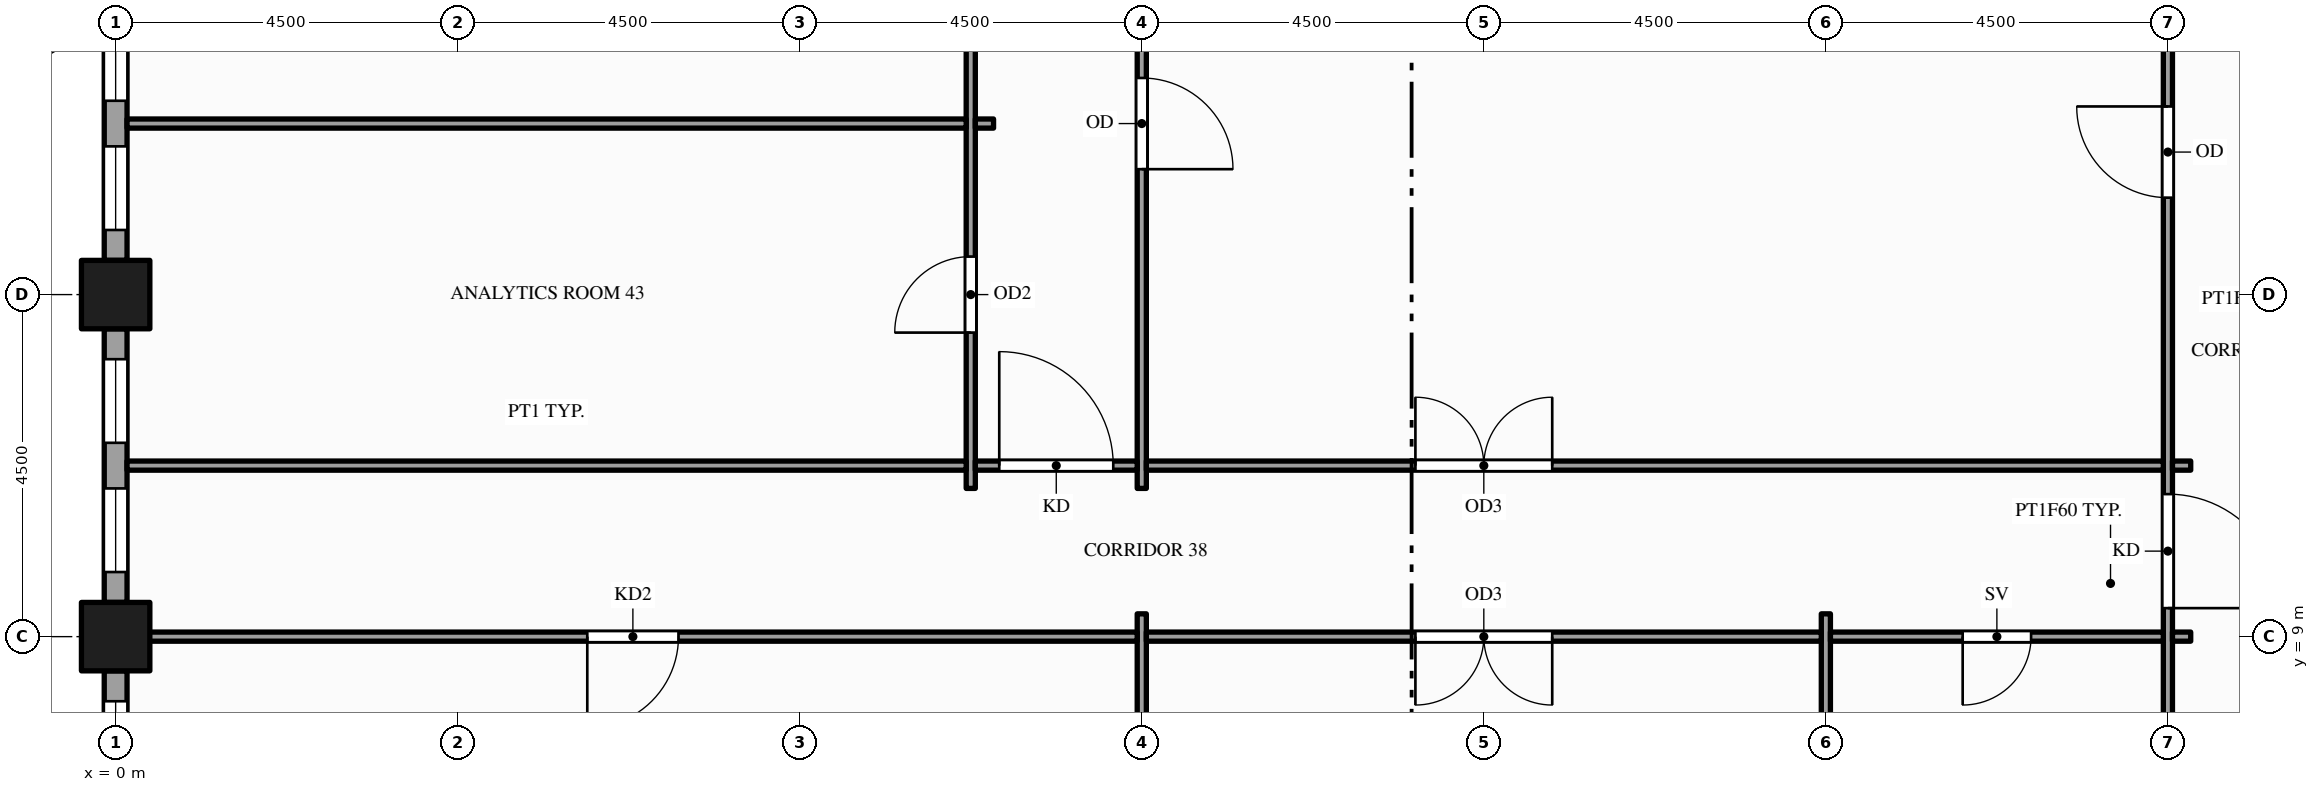
"""IFC4 building model, lengths in metres.
Left out: names, types, materials, properties, quantities, classifications, styles, units other than length and angle.
Written with IfcOpenShell. Run it as: python <this file> out.ifc"""

import sys

from ifc_helpers import new_model, si_unit, direction, frame, frame_2d, origin, origin_2d, place, context, subcontext, project, spatial, rectangle, hollow_rectangle, extrude, element, fill, save


model = new_model("IFC4")
c1 = context("Model", 3, precision=1e-05, world=origin(), true_north=direction((0.0, 1.0)))
c2 = subcontext(c1, "Body", "Model", "MODEL_VIEW")
j1 = project(units=[si_unit("LENGTHUNIT", "METRE"), si_unit("PLANEANGLEUNIT", "RADIAN")], contexts=[c1])
p1 = place(None, origin())
s1 = spatial("IfcSite", under=j1, at=p1, CompositionType="ELEMENT")
p2 = place(p1, origin())
s2 = spatial("IfcBuilding", under=s1, at=p2, CompositionType="ELEMENT")
p3 = place(p2, frame((0.0, 0.0, 183.0)))
s3 = spatial("IfcBuildingStorey", under=s2, at=p3, CompositionType="ELEMENT", Elevation=183.0)
for number, where, z_axis, x_axis in (
    (1, (0.0, 9.0, -0.15), (0.0, 0.0, 1.0), (1.0, 0.0, 0.0)),
    (2, (0.0, 13.5, -0.15), (0.0, 0.0, 1.0), (1.0, 0.0, 0.0)),
):
    element("IfcColumn", number, at=place(p3, frame(where, z_axis=z_axis, x_axis=x_axis)), inside=s3, PredefinedType="COLUMN", context=c2, shape_type="SweptSolid", body=[
        extrude(hollow_rectangle(XDim=0.9, YDim=0.9, WallThickness=0.045, at=origin_2d()), origin(), (0.0, 0.0, 1.0), 3.9),
    ])
p4 = place(p3, frame((0.0, 17.55, 0.0), z_axis=(0.0, 0.0, 1.0), x_axis=(0.0, -1.0, 0.0)))
e3 = element("IfcWall", 3, at=p4, inside=s3, PredefinedType="STANDARD", context=c2, shape_type="SweptSolid", body=[
    extrude(rectangle(XDim=3.6, YDim=0.3, at=frame_2d((1.8, 0.0))), origin(), (0.0, 0.0, 1.0), 3.049),
])
p5 = place(p4, frame((0.4, 0.0, 0.9)))
e4 = element("IfcOpeningElement", 4, at=p5, cuts=e3, PredefinedType="OPENING", context=c2, shape_type="SweptSolid", body=[
    extrude(rectangle(XDim=1.1, YDim=2.0, at=frame_2d((0.55, 1.0))), frame((0.0, 0.16, 0.0), z_axis=(0.0, -1.0, 0.0), x_axis=(1.0, 0.0, 0.0)), (0.0, 0.0, 1.0), 0.32),
])
p6 = place(p4, frame((2.1, 0.0, 0.9)))
e5 = element("IfcOpeningElement", 5, at=p6, cuts=e3, PredefinedType="OPENING", context=c2, shape_type="SweptSolid", body=[
    extrude(rectangle(XDim=1.1, YDim=2.0, at=frame_2d((0.55, 1.0))), frame((0.0, 0.16, 0.0), z_axis=(0.0, -1.0, 0.0), x_axis=(1.0, 0.0, 0.0)), (0.0, 0.0, 1.0), 0.32),
])
p7 = place(p3, frame((0.0, 13.05, 0.0), z_axis=(0.0, 0.0, 1.0), x_axis=(0.0, -1.0, 0.0)))
e6 = element("IfcWall", 6, at=p7, inside=s3, PredefinedType="STANDARD", context=c2, shape_type="SweptSolid", body=[
    extrude(rectangle(XDim=3.6, YDim=0.3, at=frame_2d((1.8, 0.0))), origin(), (0.0, 0.0, 1.0), 3.049),
])
p8 = place(p7, frame((0.4, 0.0, 0.9)))
e7 = element("IfcOpeningElement", 7, at=p8, cuts=e6, PredefinedType="OPENING", context=c2, shape_type="SweptSolid", body=[
    extrude(rectangle(XDim=1.1, YDim=2.0, at=frame_2d((0.55, 1.0))), frame((0.0, 0.16, 0.0), z_axis=(0.0, -1.0, 0.0), x_axis=(1.0, 0.0, 0.0)), (0.0, 0.0, 1.0), 0.32),
])
p9 = place(p7, frame((2.1, 0.0, 0.9)))
e8 = element("IfcOpeningElement", 8, at=p9, cuts=e6, PredefinedType="OPENING", context=c2, shape_type="SweptSolid", body=[
    extrude(rectangle(XDim=1.1, YDim=2.0, at=frame_2d((0.55, 1.0))), frame((0.0, 0.16, 0.0), z_axis=(0.0, -1.0, 0.0), x_axis=(1.0, 0.0, 0.0)), (0.0, 0.0, 1.0), 0.32),
])
p10 = place(p3, frame((0.0, 8.55, 0.0), z_axis=(0.0, 0.0, 1.0), x_axis=(0.0, -1.0, 0.0)))
e9 = element("IfcWall", 9, at=p10, inside=s3, PredefinedType="STANDARD", context=c2, shape_type="SweptSolid", body=[
    extrude(rectangle(XDim=3.6, YDim=0.3, at=frame_2d((1.8, 0.0))), origin(), (0.0, 0.0, 1.0), 3.049),
])
p11 = place(p10, frame((0.4, 0.0, 0.9)))
e10 = element("IfcOpeningElement", 10, at=p11, cuts=e9, PredefinedType="OPENING", context=c2, shape_type="SweptSolid", body=[
    extrude(rectangle(XDim=1.1, YDim=2.0, at=frame_2d((0.55, 1.0))), frame((0.0, 0.16, 0.0), z_axis=(0.0, -1.0, 0.0), x_axis=(1.0, 0.0, 0.0)), (0.0, 0.0, 1.0), 0.32),
])
p12 = place(p10, frame((2.1, 0.0, 0.9)))
e11 = element("IfcOpeningElement", 11, at=p12, cuts=e9, PredefinedType="OPENING", context=c2, shape_type="SweptSolid", body=[
    extrude(rectangle(XDim=1.1, YDim=2.0, at=frame_2d((0.55, 1.0))), frame((0.0, 0.16, 0.0), z_axis=(0.0, -1.0, 0.0), x_axis=(1.0, 0.0, 0.0)), (0.0, 0.0, 1.0), 0.32),
])
p13 = place(p3, frame((11.25, 10.95, 0.0), z_axis=(0.0, 0.0, 1.0), x_axis=(0.0, 1.0, 0.0)))
e12 = element("IfcWall", 12, at=p13, inside=s3, PredefinedType="PARTITIONING", context=c2, shape_type="SweptSolid", body=[
    extrude(rectangle(XDim=20.85, YDim=0.12, at=frame_2d((10.425, 0.0))), origin(), (0.0, 0.0, 1.0), 2.5),
])
p14 = place(p13, frame((2.05, 0.0, 0.0)))
e13 = element("IfcOpeningElement", 13, at=p14, cuts=e12, PredefinedType="OPENING", context=c2, shape_type="SweptSolid", body=[
    extrude(rectangle(XDim=1.0, YDim=2.1, at=frame_2d((0.5, 1.05))), frame((0.0, 0.07, 0.0), z_axis=(0.0, -1.0, 0.0), x_axis=(1.0, 0.0, 0.0)), (0.0, 0.0, 1.0), 0.14),
])
p15 = place(p13, frame((6.55, 0.0, 0.0)))
e14 = element("IfcOpeningElement", 14, at=p15, cuts=e12, PredefinedType="OPENING", context=c2, shape_type="SweptSolid", body=[
    extrude(rectangle(XDim=1.0, YDim=2.1, at=frame_2d((0.5, 1.05))), frame((0.0, 0.07, 0.0), z_axis=(0.0, -1.0, 0.0), x_axis=(1.0, 0.0, 0.0)), (0.0, 0.0, 1.0), 0.14),
])
p16 = place(p13, frame((12.205, 0.0, 0.0)))
e15 = element("IfcOpeningElement", 15, at=p16, cuts=e12, PredefinedType="OPENING", context=c2, shape_type="SweptSolid", body=[
    extrude(rectangle(XDim=1.0, YDim=2.1, at=frame_2d((0.5, 1.05))), frame((0.0, 0.07, 0.0), z_axis=(0.0, -1.0, 0.0), x_axis=(1.0, 0.0, 0.0)), (0.0, 0.0, 1.0), 0.14),
])
p17 = place(p3, frame((13.5, 0.15, 0.0), z_axis=(0.0, 0.0, 1.0), x_axis=(0.0, 1.0, 0.0)))
e16 = element("IfcWall", 16, at=p17, inside=s3, PredefinedType="PARTITIONING", context=c2, shape_type="SweptSolid", body=[
    extrude(rectangle(XDim=9.15, YDim=0.12, at=frame_2d((4.575, 0.0))), origin(), (0.0, 0.0, 1.0), 2.77),
])
p18 = place(p3, frame((13.5, 10.95, 0.0), z_axis=(0.0, 0.0, 1.0), x_axis=(0.0, 1.0, 0.0)))
e17 = element("IfcWall", 17, at=p18, inside=s3, PredefinedType="PARTITIONING", context=c2, shape_type="SweptSolid", body=[
    extrude(rectangle(XDim=20.85, YDim=0.12, at=frame_2d((10.425, 0.0))), origin(), (0.0, 0.0, 1.0), 2.5),
])
p19 = place(p18, frame((4.2, 0.0, 0.0)))
e18 = element("IfcOpeningElement", 18, at=p19, cuts=e17, PredefinedType="OPENING", context=c2, shape_type="SweptSolid", body=[
    extrude(rectangle(XDim=1.2, YDim=2.1, at=frame_2d((0.6, 1.05))), frame((0.0, 0.07, 0.0), z_axis=(0.0, -1.0, 0.0), x_axis=(1.0, 0.0, 0.0)), (0.0, 0.0, 1.0), 0.14),
])
p20 = place(p3, frame((22.5, 1.65, 0.0), z_axis=(0.0, 0.0, 1.0), x_axis=(0.0, 1.0, 0.0)))
e19 = element("IfcWall", 19, at=p20, inside=s3, PredefinedType="PARTITIONING", context=c2, shape_type="SweptSolid", body=[
    extrude(rectangle(XDim=7.65, YDim=0.12, at=frame_2d((3.825, 0.0))), origin(), (0.0, 0.0, 1.0), 2.77),
])
p21 = place(p3, frame((27.0, 1.65, 0.0), z_axis=(0.0, 0.0, 1.0), x_axis=(0.0, 1.0, 0.0)))
e20 = element("IfcWall", 20, at=p21, inside=s3, PredefinedType="PARTITIONING", context=c2, shape_type="SweptSolid", body=[
    extrude(rectangle(XDim=22.2, YDim=0.12, at=frame_2d((11.1, 0.0))), origin(), (0.0, 0.0, 1.0), 2.35),
])
p22 = place(p21, frame((7.725, 0.0, 0.0)))
e21 = element("IfcOpeningElement", 21, at=p22, cuts=e20, PredefinedType="OPENING", context=c2, shape_type="SweptSolid", body=[
    extrude(rectangle(XDim=1.5, YDim=2.1, at=frame_2d((0.75, 1.05))), frame((0.0, 0.07, 0.0), z_axis=(0.0, -1.0, 0.0), x_axis=(1.0, 0.0, 0.0)), (0.0, 0.0, 1.0), 0.14),
])
p23 = place(p21, frame((13.125, 0.0, 0.0)))
e22 = element("IfcOpeningElement", 22, at=p23, cuts=e20, PredefinedType="OPENING", context=c2, shape_type="SweptSolid", body=[
    extrude(rectangle(XDim=1.2, YDim=2.1, at=frame_2d((0.6, 1.05))), frame((0.0, 0.07, 0.0), z_axis=(0.0, -1.0, 0.0), x_axis=(1.0, 0.0, 0.0)), (0.0, 0.0, 1.0), 0.14),
])
p24 = place(p3, frame((0.15, 9.0, 0.0), z_axis=(0.0, 0.0, 1.0), x_axis=(1.0, 0.0, 0.0)))
e23 = element("IfcWall", 23, at=p24, inside=s3, PredefinedType="PARTITIONING", context=c2, shape_type="SweptSolid", body=[
    extrude(rectangle(XDim=13.29, YDim=0.12, at=frame_2d((6.645, 0.0))), origin(), (0.0, 0.0, 1.0), 2.77),
])
p25 = place(p24, frame((6.055, 0.0, 0.0)))
e24 = element("IfcOpeningElement", 24, at=p25, cuts=e23, PredefinedType="OPENING", context=c2, shape_type="SweptSolid", body=[
    extrude(rectangle(XDim=1.2, YDim=2.1, at=frame_2d((0.6, 1.05))), frame((0.0, 0.07, 0.0), z_axis=(0.0, -1.0, 0.0), x_axis=(1.0, 0.0, 0.0)), (0.0, 0.0, 1.0), 0.14),
])
p26 = place(p3, frame((13.56, 9.0, 0.0), z_axis=(0.0, 0.0, 1.0), x_axis=(1.0, 0.0, 0.0)))
e25 = element("IfcWall", 25, at=p26, inside=s3, PredefinedType="PARTITIONING", context=c2, shape_type="SweptSolid", body=[
    extrude(rectangle(XDim=8.88, YDim=0.12, at=frame_2d((4.44, 0.0))), origin(), (0.0, 0.0, 1.0), 2.77),
])
p27 = place(p26, frame((3.54, 0.0, 0.0)))
e26 = element("IfcOpeningElement", 26, at=p27, cuts=e25, PredefinedType="OPENING", context=c2, shape_type="SweptSolid", body=[
    extrude(rectangle(XDim=1.8, YDim=2.1, at=frame_2d((0.9, 1.05))), frame((0.0, 0.07, 0.0), z_axis=(0.0, -1.0, 0.0), x_axis=(1.0, 0.0, 0.0)), (0.0, 0.0, 1.0), 0.14),
])
p28 = place(p3, frame((22.56, 9.0, 0.0), z_axis=(0.0, 0.0, 1.0), x_axis=(1.0, 0.0, 0.0)))
e27 = element("IfcWall", 27, at=p28, inside=s3, PredefinedType="PARTITIONING", context=c2, shape_type="SweptSolid", body=[
    extrude(rectangle(XDim=4.38, YDim=0.12, at=frame_2d((2.19, 0.0))), origin(), (0.0, 0.0, 1.0), 2.77),
])
p29 = place(p28, frame((1.74, 0.0, 0.0)))
e28 = element("IfcOpeningElement", 28, at=p29, cuts=e27, PredefinedType="OPENING", context=c2, shape_type="SweptSolid", body=[
    extrude(rectangle(XDim=0.9, YDim=2.1, at=frame_2d((0.45, 1.05))), frame((0.0, 0.07, 0.0), z_axis=(0.0, -1.0, 0.0), x_axis=(1.0, 0.0, 0.0)), (0.0, 0.0, 1.0), 0.14),
])
p30 = place(p3, frame((27.06, 9.0, 0.0), z_axis=(0.0, 0.0, 1.0), x_axis=(1.0, 0.0, 0.0)))
e29 = element("IfcWall", 29, at=p30, inside=s3, PredefinedType="PARTITIONING", context=c2, shape_type="SweptSolid", body=[
    extrude(rectangle(XDim=0.24, YDim=0.12, at=frame_2d((0.12, 0.0))), origin(), (0.0, 0.0, 1.0), 2.77),
])
p31 = place(p3, frame((0.15, 11.25, 0.0), z_axis=(0.0, 0.0, 1.0), x_axis=(1.0, 0.0, 0.0)))
e30 = element("IfcWall", 30, at=p31, inside=s3, PredefinedType="PARTITIONING", context=c2, shape_type="SweptSolid", body=[
    extrude(rectangle(XDim=11.04, YDim=0.12, at=frame_2d((5.52, 0.0))), origin(), (0.0, 0.0, 1.0), 2.77),
])
p32 = place(p3, frame((11.31, 11.25, 0.0), z_axis=(0.0, 0.0, 1.0), x_axis=(1.0, 0.0, 0.0)))
e31 = element("IfcWall", 31, at=p32, inside=s3, PredefinedType="PARTITIONING", context=c2, shape_type="SweptSolid", body=[
    extrude(rectangle(XDim=2.13, YDim=0.12, at=frame_2d((1.065, 0.0))), origin(), (0.0, 0.0, 1.0), 2.77),
])
p33 = place(p32, frame((0.315, 0.0, 0.0)))
e32 = element("IfcOpeningElement", 32, at=p33, cuts=e31, PredefinedType="OPENING", context=c2, shape_type="SweptSolid", body=[
    extrude(rectangle(XDim=1.5, YDim=2.1, at=frame_2d((0.75, 1.05))), frame((0.0, 0.07, 0.0), z_axis=(0.0, -1.0, 0.0), x_axis=(1.0, 0.0, 0.0)), (0.0, 0.0, 1.0), 0.14),
])
p34 = place(p3, frame((13.56, 11.25, 0.0), z_axis=(0.0, 0.0, 1.0), x_axis=(1.0, 0.0, 0.0)))
e33 = element("IfcWall", 33, at=p34, inside=s3, PredefinedType="PARTITIONING", context=c2, shape_type="SweptSolid", body=[
    extrude(rectangle(XDim=13.38, YDim=0.12, at=frame_2d((6.69, 0.0))), origin(), (0.0, 0.0, 1.0), 2.77),
])
p35 = place(p34, frame((3.54, 0.0, 0.0)))
e34 = element("IfcOpeningElement", 34, at=p35, cuts=e33, PredefinedType="OPENING", context=c2, shape_type="SweptSolid", body=[
    extrude(rectangle(XDim=1.8, YDim=2.1, at=frame_2d((0.9, 1.05))), frame((0.0, 0.07, 0.0), z_axis=(0.0, -1.0, 0.0), x_axis=(1.0, 0.0, 0.0)), (0.0, 0.0, 1.0), 0.14),
])
p36 = place(p3, frame((27.06, 11.25, 0.0), z_axis=(0.0, 0.0, 1.0), x_axis=(1.0, 0.0, 0.0)))
e35 = element("IfcWall", 35, at=p36, inside=s3, PredefinedType="PARTITIONING", context=c2, shape_type="SweptSolid", body=[
    extrude(rectangle(XDim=0.24, YDim=0.12, at=frame_2d((0.12, 0.0))), origin(), (0.0, 0.0, 1.0), 2.77),
])
p37 = place(p3, frame((0.15, 15.75, 0.0), z_axis=(0.0, 0.0, 1.0), x_axis=(1.0, 0.0, 0.0)))
e36 = element("IfcWall", 36, at=p37, inside=s3, PredefinedType="PARTITIONING", context=c2, shape_type="SweptSolid", body=[
    extrude(rectangle(XDim=11.04, YDim=0.12, at=frame_2d((5.52, 0.0))), origin(), (0.0, 0.0, 1.0), 2.77),
])
p38 = place(p3, frame((11.31, 15.75, 0.0), z_axis=(0.0, 0.0, 1.0), x_axis=(1.0, 0.0, 0.0)))
e37 = element("IfcWall", 37, at=p38, inside=s3, PredefinedType="PARTITIONING", context=c2, shape_type="SweptSolid", body=[
    extrude(rectangle(XDim=0.24, YDim=0.12, at=frame_2d((0.12, 0.0))), origin(), (0.0, 0.0, 1.0), 2.77),
])
p39 = place(p5, origin())
e38 = element("IfcWindow", 38, at=p39, inside=s3, PartitioningType="SINGLE_PANEL", PredefinedType="WINDOW", context=c2, shape_type="SweptSolid", body=[
    extrude(rectangle(XDim=1.1, YDim=2.0, at=frame_2d((0.55, 1.0))), frame((0.0, 0.03, 0.0), z_axis=(0.0, -1.0, 0.0), x_axis=(1.0, 0.0, 0.0)), (0.0, 0.0, 1.0), 0.06),
])
fill(e4, e38)
p40 = place(p6, origin())
e39 = element("IfcWindow", 39, at=p40, inside=s3, PartitioningType="SINGLE_PANEL", PredefinedType="WINDOW", context=c2, shape_type="SweptSolid", body=[
    extrude(rectangle(XDim=1.1, YDim=2.0, at=frame_2d((0.55, 1.0))), frame((0.0, 0.03, 0.0), z_axis=(0.0, -1.0, 0.0), x_axis=(1.0, 0.0, 0.0)), (0.0, 0.0, 1.0), 0.06),
])
fill(e5, e39)
p41 = place(p8, origin())
e40 = element("IfcWindow", 40, at=p41, inside=s3, PartitioningType="SINGLE_PANEL", PredefinedType="WINDOW", context=c2, shape_type="SweptSolid", body=[
    extrude(rectangle(XDim=1.1, YDim=2.0, at=frame_2d((0.55, 1.0))), frame((0.0, 0.03, 0.0), z_axis=(0.0, -1.0, 0.0), x_axis=(1.0, 0.0, 0.0)), (0.0, 0.0, 1.0), 0.06),
])
fill(e7, e40)
p42 = place(p9, origin())
e41 = element("IfcWindow", 41, at=p42, inside=s3, PartitioningType="SINGLE_PANEL", PredefinedType="WINDOW", context=c2, shape_type="SweptSolid", body=[
    extrude(rectangle(XDim=1.1, YDim=2.0, at=frame_2d((0.55, 1.0))), frame((0.0, 0.03, 0.0), z_axis=(0.0, -1.0, 0.0), x_axis=(1.0, 0.0, 0.0)), (0.0, 0.0, 1.0), 0.06),
])
fill(e8, e41)
p43 = place(p11, origin())
e42 = element("IfcWindow", 42, at=p43, inside=s3, PartitioningType="SINGLE_PANEL", PredefinedType="WINDOW", context=c2, shape_type="SweptSolid", body=[
    extrude(rectangle(XDim=1.1, YDim=2.0, at=frame_2d((0.55, 1.0))), frame((0.0, 0.03, 0.0), z_axis=(0.0, -1.0, 0.0), x_axis=(1.0, 0.0, 0.0)), (0.0, 0.0, 1.0), 0.06),
])
fill(e10, e42)
p44 = place(p22, origin())
e43 = element("IfcDoor", 43, at=p44, inside=s3, OperationType="SINGLE_SWING_LEFT", PredefinedType="DOOR", context=c2, shape_type="SweptSolid", body=[
    extrude(rectangle(XDim=1.5, YDim=2.1, at=frame_2d((0.75, 1.05))), frame((0.0, 0.025, 0.0), z_axis=(0.0, -1.0, 0.0), x_axis=(1.0, 0.0, 0.0)), (0.0, 0.0, 1.0), 0.05),
])
fill(e21, e43)
p45 = place(p25, origin())
e44 = element("IfcDoor", 44, at=p45, inside=s3, OperationType="SINGLE_SWING_LEFT", PredefinedType="DOOR", context=c2, shape_type="SweptSolid", body=[
    extrude(rectangle(XDim=1.2, YDim=2.1, at=frame_2d((0.6, 1.05))), frame((0.0, 0.025, 0.0), z_axis=(0.0, -1.0, 0.0), x_axis=(1.0, 0.0, 0.0)), (0.0, 0.0, 1.0), 0.05),
])
fill(e24, e44)
p46 = place(p27, origin())
e45 = element("IfcDoor", 45, at=p46, inside=s3, OperationType="DOUBLE_DOOR_SINGLE_SWING", PredefinedType="DOOR", context=c2, shape_type="SweptSolid", body=[
    extrude(rectangle(XDim=1.8, YDim=2.1, at=frame_2d((0.9, 1.05))), frame((0.0, 0.025, 0.0), z_axis=(0.0, -1.0, 0.0), x_axis=(1.0, 0.0, 0.0)), (0.0, 0.0, 1.0), 0.05),
])
fill(e26, e45)
p47 = place(p29, origin())
e46 = element("IfcDoor", 46, at=p47, inside=s3, OperationType="SINGLE_SWING_LEFT", PredefinedType="DOOR", context=c2, shape_type="SweptSolid", body=[
    extrude(rectangle(XDim=0.9, YDim=2.1, at=frame_2d((0.45, 1.05))), frame((0.0, 0.025, 0.0), z_axis=(0.0, -1.0, 0.0), x_axis=(1.0, 0.0, 0.0)), (0.0, 0.0, 1.0), 0.05),
])
fill(e28, e46)
p48 = place(p35, origin())
e47 = element("IfcDoor", 47, at=p48, inside=s3, OperationType="DOUBLE_DOOR_SINGLE_SWING", PredefinedType="DOOR", context=c2, shape_type="SweptSolid", body=[
    extrude(rectangle(XDim=1.8, YDim=2.1, at=frame_2d((0.9, 1.05))), frame((0.0, 0.025, 0.0), z_axis=(0.0, -1.0, 0.0), x_axis=(1.0, 0.0, 0.0)), (0.0, 0.0, 1.0), 0.05),
])
fill(e34, e47)
p49 = place(p33, origin())
e48 = element("IfcDoor", 48, at=p49, inside=s3, OperationType="SINGLE_SWING_LEFT", PredefinedType="DOOR", context=c2, shape_type="SweptSolid", body=[
    extrude(rectangle(XDim=1.5, YDim=2.1, at=frame_2d((0.75, 1.05))), frame((0.0, 0.025, 0.0), z_axis=(0.0, -1.0, 0.0), x_axis=(1.0, 0.0, 0.0)), (0.0, 0.0, 1.0), 0.05),
])
fill(e32, e48)
p50 = place(p14, origin())
e49 = element("IfcDoor", 49, at=p50, inside=s3, OperationType="SINGLE_SWING_LEFT", PredefinedType="DOOR", context=c2, shape_type="SweptSolid", body=[
    extrude(rectangle(XDim=1.0, YDim=2.1, at=frame_2d((0.5, 1.05))), frame((0.0, 0.025, 0.0), z_axis=(0.0, -1.0, 0.0), x_axis=(1.0, 0.0, 0.0)), (0.0, 0.0, 1.0), 0.05),
])
fill(e13, e49)
p51 = place(p19, origin())
e50 = element("IfcDoor", 50, at=p51, inside=s3, OperationType="SINGLE_SWING_LEFT", PredefinedType="DOOR", context=c2, shape_type="SweptSolid", body=[
    extrude(rectangle(XDim=1.2, YDim=2.1, at=frame_2d((0.6, 1.05))), frame((0.0, 0.025, 0.0), z_axis=(0.0, -1.0, 0.0), x_axis=(1.0, 0.0, 0.0)), (0.0, 0.0, 1.0), 0.05),
])
fill(e18, e50)
p52 = place(p23, origin())
e51 = element("IfcDoor", 51, at=p52, inside=s3, OperationType="SINGLE_SWING_RIGHT", PredefinedType="DOOR", context=c2, shape_type="SweptSolid", body=[
    extrude(rectangle(XDim=1.2, YDim=2.1, at=frame_2d((0.6, 1.05))), frame((0.0, 0.025, 0.0), z_axis=(0.0, -1.0, 0.0), x_axis=(1.0, 0.0, 0.0)), (0.0, 0.0, 1.0), 0.05),
])
fill(e22, e51)
save(model, sys.argv[1])
